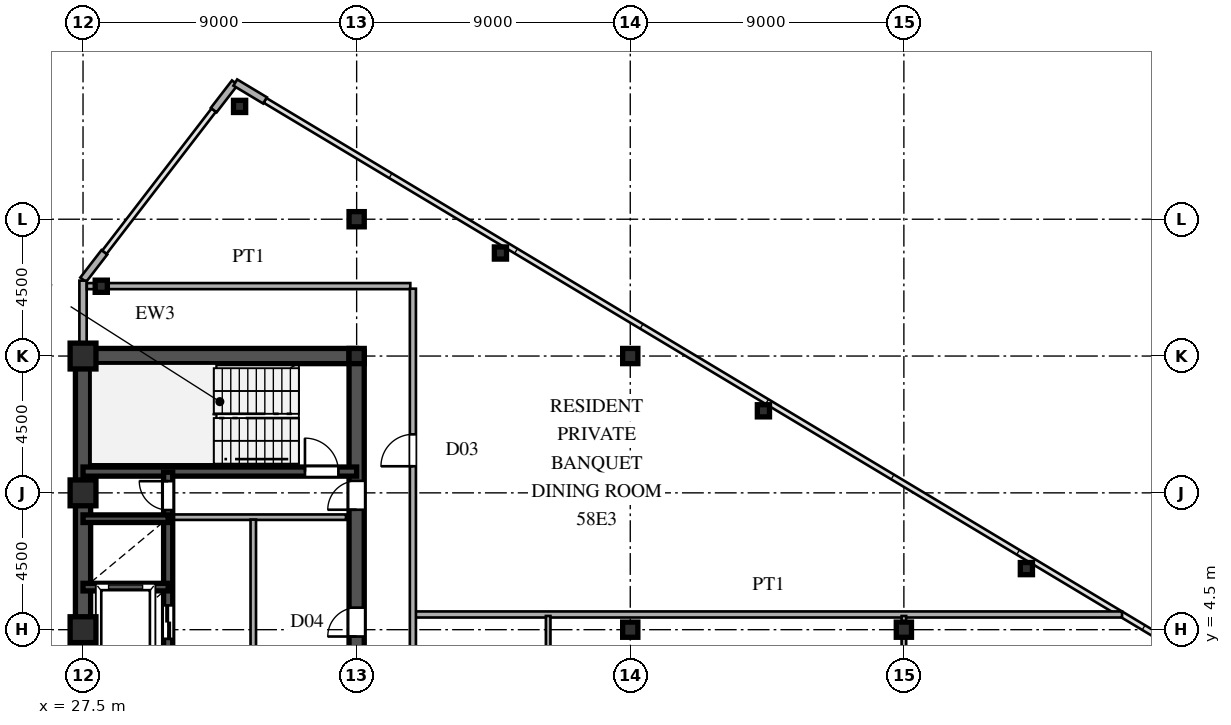
"""IFC4 building model, lengths in metres.
Left out: names, types, materials, properties, quantities, classifications, styles, units other than length and angle.
Written with IfcOpenShell. Run it as: python <this file> out.ifc"""

import sys

from ifc_helpers import new_model, si_unit, direction, frame, frame_2d, origin, origin_2d, place, context, subcontext, project, spatial, rectangle, hollow_rectangle, i_section, extrude, source, transform, mapped, element, fill, save


model = new_model("IFC4")
c1 = context("Model", 3, precision=1e-05, world=origin(), true_north=direction((0.0, 1.0)))
c2 = subcontext(c1, "Body", "Model", "MODEL_VIEW")
j1 = project(units=[si_unit("LENGTHUNIT", "METRE"), si_unit("PLANEANGLEUNIT", "RADIAN")], contexts=[c1])
p1 = place(None, origin())
s1 = spatial("IfcSite", under=j1, at=p1, CompositionType="ELEMENT")
p2 = place(p1, origin())
s2 = spatial("IfcBuilding", under=s1, at=p2, CompositionType="ELEMENT")
p3 = place(p2, frame((0.0, 0.0, 217.5)))
s3 = spatial("IfcBuildingStorey", under=s2, at=p3, CompositionType="ELEMENT", Elevation=217.5)
m1 = source(origin(), c2, "Body", "SweptSolid", [
    extrude(hollow_rectangle(XDim=0.85, YDim=0.85, WallThickness=0.036, at=origin_2d()), origin(), (0.0, 0.0, 1.0), 3.6),
])
for number, where, z_axis, x_axis in (
    (1, (27.5, 4.5, 0.0), (0.0, 0.0, 1.0), (1.0, 0.0, 0.0)),
    (2, (27.5, 9.0, 0.0), (0.0, 0.0, 1.0), (1.0, 0.0, 0.0)),
    (3, (27.5, 13.5, 0.0), (0.0, 0.0, 1.0), (1.0, 0.0, 0.0)),
):
    element("IfcColumn", number, at=place(p3, frame(where, z_axis=z_axis, x_axis=x_axis)), inside=s3, PredefinedType="COLUMN", context=c2, shape_type="MappedRepresentation", body=[
        mapped(m1, transform((0.0, 0.0, 0.0), scale=1.0)),
    ])
m2 = source(origin(), c2, "Body", "SweptSolid", [
    extrude(i_section(OverallWidth=0.5, OverallDepth=0.5, WebThickness=0.02, FlangeThickness=0.032, at=origin_2d()), origin(), (0.0, 0.0, 1.0), 3.6),
])
for number, where, z_axis, x_axis in (
    (4, (36.5, 13.5, 0.0), (0.0, 0.0, 1.0), (1.0, 0.0, 0.0)),
    (5, (36.5, 18.0, 0.0), (0.0, 0.0, 1.0), (1.0, 0.0, 0.0)),
    (6, (45.5, 4.5, 0.0), (0.0, 0.0, 1.0), (1.0, 0.0, 0.0)),
    (7, (45.5, 13.5, 0.0), (0.0, 0.0, 1.0), (1.0, 0.0, 0.0)),
    (8, (54.5, 4.5, 0.0), (0.0, 0.0, 1.0), (1.0, 0.0, 0.0)),
):
    element("IfcColumn", number, at=place(p3, frame(where, z_axis=z_axis, x_axis=x_axis)), inside=s3, PredefinedType="COLUMN", context=c2, shape_type="MappedRepresentation", body=[
        mapped(m2, transform((0.0, 0.0, 0.0), scale=1.0)),
    ])
m3 = source(origin(), c2, "Body", "SweptSolid", [
    extrude(hollow_rectangle(XDim=0.4, YDim=0.4, WallThickness=0.016, at=origin_2d()), origin(), (0.0, 0.0, 1.0), 3.6),
])
for number, where, z_axis, x_axis in (
    (9, (32.65, 21.71, 0.0), (0.0, 0.0, 1.0), (1.0, 0.0, 0.0)),
    (10, (28.1, 15.796, 0.0), (0.0, 0.0, 1.0), (1.0, 0.0, 0.0)),
    (11, (41.23, 16.889, 0.0), (0.0, 0.0, 1.0), (1.0, 0.0, 0.0)),
    (12, (49.88, 11.699, 0.0), (0.0, 0.0, 1.0), (1.0, 0.0, 0.0)),
    (13, (58.53, 6.509, 0.0), (0.0, 0.0, 1.0), (1.0, 0.0, 0.0)),
):
    element("IfcColumn", number, at=place(p3, frame(where, z_axis=z_axis, x_axis=x_axis)), inside=s3, PredefinedType="COLUMN", context=c2, shape_type="MappedRepresentation", body=[
        mapped(m3, transform((0.0, 0.0, 0.0), scale=1.0)),
    ])
for number, where, z_axis, x_axis in (
    (14, (33.486, 21.908, 0.0), (0.0, 0.0, 1.0), (-0.857, 0.515, 0.0)),
    (15, (32.494, 22.492, 0.0), (0.0, 0.0, 1.0), (-0.61, -0.793, 0.0)),
    (16, (28.201, 16.912, 0.0), (0.0, 0.0, 1.0), (-0.61, -0.793, 0.0)),
):
    element("IfcWall", number, at=place(p3, frame(where, z_axis=z_axis, x_axis=x_axis)), inside=s3, PredefinedType="SOLIDWALL", context=c2, shape_type="SweptSolid", body=[
        extrude(rectangle(XDim=1.14, YDim=0.24, at=frame_2d((0.57, 0.0))), origin(), (0.0, 0.0, 1.0), 3.38),
    ])
p4 = place(p3, frame((27.5, 13.755, 0.0), z_axis=(0.0, 0.0, 1.0), x_axis=(0.0, 1.0, 0.0)))
e17 = element("IfcWall", 17, at=p4, inside=s3, PredefinedType="SOLIDWALL", context=c2, shape_type="SweptSolid", body=[
    extrude(rectangle(XDim=0.62, YDim=0.24, at=frame_2d((0.31, 0.0))), origin(), (0.0, 0.0, 1.0), 2.88),
])
p5 = place(p3, frame((27.5, 14.375, 0.0), z_axis=(0.0, 0.0, 1.0), x_axis=(0.0, 1.0, 0.0)))
e18 = element("IfcWall", 18, at=p5, inside=s3, PredefinedType="SOLIDWALL", context=c2, shape_type="SweptSolid", body=[
    extrude(rectangle(XDim=1.605, YDim=0.24, at=frame_2d((0.803, 0.0))), origin(), (0.0, 0.0, 1.0), 3.38),
])
p6 = place(p3, frame((27.5, 1.3, 0.0), z_axis=(0.0, 0.0, 1.0), x_axis=(0.0, 1.0, 0.0)))
e19 = element("IfcWall", 19, at=p6, inside=s3, PredefinedType="SHEAR", context=c2, shape_type="SweptSolid", body=[
    extrude(rectangle(XDim=12.2, YDim=0.5, at=frame_2d((6.1, 0.0))), origin(), (0.0, 0.0, 1.0), 3.38),
])
p7 = place(p3, frame((27.5, 13.5, 0.0), z_axis=(0.0, 0.0, 1.0), x_axis=(1.0, 0.0, 0.0)))
e20 = element("IfcWall", 20, at=p7, inside=s3, PredefinedType="SHEAR", context=c2, shape_type="SweptSolid", body=[
    extrude(rectangle(XDim=9.0, YDim=0.5, at=frame_2d((4.5, 0.0))), origin(), (0.0, 0.0, 1.0), 3.38),
])
p8 = place(p3, frame((36.5, 8.2, 0.0), z_axis=(0.0, 0.0, 1.0), x_axis=(0.0, 1.0, 0.0)))
e21 = element("IfcWall", 21, at=p8, inside=s3, PredefinedType="SHEAR", context=c2, shape_type="SweptSolid", body=[
    extrude(rectangle(XDim=5.45, YDim=0.5, at=frame_2d((2.725, 0.0))), origin(), (0.0, 0.0, 1.0), 3.38),
])
p9 = place(p8, frame((0.245, 0.0, 0.0)))
e22 = element("IfcOpeningElement", 22, at=p9, cuts=e21, PredefinedType="OPENING", context=c2, shape_type="SweptSolid", body=[
    extrude(rectangle(XDim=0.95, YDim=2.15, at=frame_2d((0.475, 1.075))), frame((0.0, 0.26, 0.0), z_axis=(0.0, -1.0, 0.0), x_axis=(1.0, 0.0, 0.0)), (0.0, 0.0, 1.0), 0.52),
])
p10 = place(p3, frame((36.5, 1.3, 0.0), z_axis=(0.0, 0.0, 1.0), x_axis=(0.0, 1.0, 0.0)))
e23 = element("IfcWall", 23, at=p10, inside=s3, PredefinedType="SHEAR", context=c2, shape_type="SweptSolid", body=[
    extrude(rectangle(XDim=6.9, YDim=0.5, at=frame_2d((3.45, 0.0))), origin(), (0.0, 0.0, 1.0), 3.38),
])
p11 = place(p10, frame((2.975, 0.0, 0.0)))
e24 = element("IfcOpeningElement", 24, at=p11, cuts=e23, PredefinedType="OPENING", context=c2, shape_type="SweptSolid", body=[
    extrude(rectangle(XDim=0.95, YDim=2.15, at=frame_2d((0.475, 1.075))), frame((0.0, 0.26, 0.0), z_axis=(0.0, -1.0, 0.0), x_axis=(1.0, 0.0, 0.0)), (0.0, 0.0, 1.0), 0.52),
])
p12 = place(p3, frame((27.5, 9.7, 0.0), z_axis=(0.0, 0.0, 1.0), x_axis=(1.0, 0.0, 0.0)))
e25 = element("IfcWall", 25, at=p12, inside=s3, PredefinedType="SHEAR", context=c2, shape_type="SweptSolid", body=[
    extrude(rectangle(XDim=9.0, YDim=0.3, at=frame_2d((4.5, 0.0))), origin(), (0.0, 0.0, 1.0), 3.38),
])
p13 = place(p12, frame((7.3, 0.0, 0.0)))
e26 = element("IfcOpeningElement", 26, at=p13, cuts=e25, PredefinedType="OPENING", context=c2, shape_type="SweptSolid", body=[
    extrude(rectangle(XDim=1.1, YDim=2.2, at=frame_2d((0.55, 1.1))), frame((0.0, 0.16, 0.0), z_axis=(0.0, -1.0, 0.0), x_axis=(1.0, 0.0, 0.0)), (0.0, 0.0, 1.0), 0.32),
])
for number, where, z_axis, x_axis in (
    (27, (27.5, 5.9, 0.0), (0.0, 0.0, 1.0), (1.0, 0.0, 0.0)),
    (28, (27.5, 8.15, 0.0), (0.0, 0.0, 1.0), (1.0, 0.0, 0.0)),
):
    element("IfcWall", number, at=place(p3, frame(where, z_axis=z_axis, x_axis=x_axis)), inside=s3, PredefinedType="SHEAR", context=c2, shape_type="SweptSolid", body=[
        extrude(rectangle(XDim=2.8, YDim=0.25, at=frame_2d((1.4, 0.0))), origin(), (0.0, 0.0, 1.0), 3.38),
    ])
p14 = place(p3, frame((30.3, 3.6, 0.0), z_axis=(0.0, 0.0, 1.0), x_axis=(0.0, 1.0, 0.0)))
e29 = element("IfcWall", 29, at=p14, inside=s3, PredefinedType="SHEAR", context=c2, shape_type="SweptSolid", body=[
    extrude(rectangle(XDim=2.3, YDim=0.3, at=frame_2d((1.15, 0.0))), origin(), (0.0, 0.0, 1.0), 3.38),
])
p15 = place(p14, frame((0.6, 0.0, 0.0)))
e30 = element("IfcOpeningElement", 30, at=p15, cuts=e29, PredefinedType="OPENING", context=c2, shape_type="SweptSolid", body=[
    extrude(rectangle(XDim=1.1, YDim=2.2, at=frame_2d((0.55, 1.1))), frame((0.0, 0.16, 0.0), z_axis=(0.0, -1.0, 0.0), x_axis=(1.0, 0.0, 0.0)), (0.0, 0.0, 1.0), 0.32),
])
p16 = place(p3, frame((30.3, 5.9, 0.0), z_axis=(0.0, 0.0, 1.0), x_axis=(0.0, 1.0, 0.0)))
e31 = element("IfcWall", 31, at=p16, inside=s3, PredefinedType="SHEAR", context=c2, shape_type="SweptSolid", body=[
    extrude(rectangle(XDim=2.25, YDim=0.3, at=frame_2d((1.125, 0.0))), origin(), (0.0, 0.0, 1.0), 3.38),
])
p17 = place(p3, frame((30.3, 8.15, 0.0), z_axis=(0.0, 0.0, 1.0), x_axis=(0.0, 1.0, 0.0)))
e32 = element("IfcWall", 32, at=p17, inside=s3, PredefinedType="SHEAR", context=c2, shape_type="SweptSolid", body=[
    extrude(rectangle(XDim=1.53, YDim=0.3, at=frame_2d((0.765, 0.0))), origin(), (0.0, 0.0, 1.0), 3.38),
])
p18 = place(p17, frame((0.285, 0.0, 0.0)))
e33 = element("IfcOpeningElement", 33, at=p18, cuts=e32, PredefinedType="OPENING", context=c2, shape_type="SweptSolid", body=[
    extrude(rectangle(XDim=0.95, YDim=2.15, at=frame_2d((0.475, 1.075))), frame((0.0, 0.16, 0.0), z_axis=(0.0, -1.0, 0.0), x_axis=(1.0, 0.0, 0.0)), (0.0, 0.0, 1.0), 0.32),
])
p19 = place(p3, frame((30.45, 8.2, 0.0), z_axis=(0.0, 0.0, 1.0), x_axis=(1.0, 0.0, 0.0)))
e34 = element("IfcWall", 34, at=p19, inside=s3, PredefinedType="PARTITIONING", context=c2, shape_type="SweptSolid", body=[
    extrude(rectangle(XDim=5.7, YDim=0.18, at=frame_2d((2.85, 0.0))), origin(), (0.0, 0.0, 1.0), 3.38),
])
p20 = place(p3, frame((33.1, 1.38, 0.0), z_axis=(0.0, 0.0, 1.0), x_axis=(0.0, 1.0, 0.0)))
e35 = element("IfcWall", 35, at=p20, inside=s3, PredefinedType="PARTITIONING", context=c2, shape_type="SweptSolid", body=[
    extrude(rectangle(XDim=6.74, YDim=0.18, at=frame_2d((3.37, 0.0))), origin(), (0.0, 0.0, 1.0), 3.38),
])
p21 = place(p3, frame((38.43, 5.0, 0.0), z_axis=(0.0, 0.0, 1.0), x_axis=(1.0, 0.0, 0.0)))
e36 = element("IfcWall", 36, at=p21, inside=s3, PredefinedType="PARTITIONING", context=c2, shape_type="SweptSolid", body=[
    extrude(rectangle(XDim=23.246, YDim=0.2, at=frame_2d((11.623, 0.0))), origin(), (0.0, 0.0, 1.0), 3.38),
])
p22 = place(p3, frame((27.625, 15.8, 0.0), z_axis=(0.0, 0.0, 1.0), x_axis=(1.0, 0.0, 0.0)))
e37 = element("IfcWall", 37, at=p22, inside=s3, PredefinedType="PARTITIONING", context=c2, shape_type="SweptSolid", body=[
    extrude(rectangle(XDim=10.64, YDim=0.2, at=frame_2d((5.32, 0.0))), origin(), (0.0, 0.0, 1.0), 3.38),
])
p23 = place(p3, frame((38.35, -15.715, 0.0), z_axis=(0.0, 0.0, 1.0), x_axis=(0.0, 1.0, 0.0)))
e38 = element("IfcWall", 38, at=p23, inside=s3, PredefinedType="PARTITIONING", context=c2, shape_type="SweptSolid", body=[
    extrude(rectangle(XDim=31.43, YDim=0.2, at=frame_2d((15.715, 0.0))), origin(), (0.0, 0.0, 1.0), 3.38),
])
p24 = place(p23, frame((3.09, 0.0, 0.0)))
e39 = element("IfcOpeningElement", 39, at=p24, cuts=e38, PredefinedType="OPENING", context=c2, shape_type="SweptSolid", body=[
    extrude(rectangle(XDim=1.05, YDim=2.25, at=frame_2d((0.525, 1.125))), frame((0.0, 0.11, 0.0), z_axis=(0.0, -1.0, 0.0), x_axis=(1.0, 0.0, 0.0)), (0.0, 0.0, 1.0), 0.22),
])
p25 = place(p23, frame((13.289, 0.0, 0.0)))
e40 = element("IfcOpeningElement", 40, at=p25, cuts=e38, PredefinedType="OPENING", context=c2, shape_type="SweptSolid", body=[
    extrude(rectangle(XDim=1.05, YDim=2.25, at=frame_2d((0.525, 1.125))), frame((0.0, 0.11, 0.0), z_axis=(0.0, -1.0, 0.0), x_axis=(1.0, 0.0, 0.0)), (0.0, 0.0, 1.0), 0.22),
])
p26 = place(p23, frame((25.59, 0.0, 0.0)))
e41 = element("IfcOpeningElement", 41, at=p26, cuts=e38, PredefinedType="OPENING", context=c2, shape_type="SweptSolid", body=[
    extrude(rectangle(XDim=1.05, YDim=2.25, at=frame_2d((0.525, 1.125))), frame((0.0, 0.11, 0.0), z_axis=(0.0, -1.0, 0.0), x_axis=(1.0, 0.0, 0.0)), (0.0, 0.0, 1.0), 0.22),
])
p27 = place(p3, frame((42.8, 1.032, 0.0), z_axis=(0.0, 0.0, 1.0), x_axis=(0.0, 1.0, 0.0)))
e42 = element("IfcWall", 42, at=p27, inside=s3, PredefinedType="PARTITIONING", context=c2, shape_type="SweptSolid", body=[
    extrude(rectangle(XDim=3.918, YDim=0.15, at=frame_2d((1.959, 0.0))), origin(), (0.0, 0.0, 1.0), 3.38),
])
p28 = place(p3, frame((54.5, -8.35, 0.0), z_axis=(0.0, 0.0, 1.0), x_axis=(0.0, 1.0, 0.0)))
e43 = element("IfcWall", 43, at=p28, inside=s3, PredefinedType="PARTITIONING", context=c2, shape_type="SweptSolid", body=[
    extrude(rectangle(XDim=13.3, YDim=0.15, at=frame_2d((6.65, 0.0))), origin(), (0.0, 0.0, 1.0), 2.78),
])
p29 = place(p28, frame((6.175, 0.0, 0.0)))
e44 = element("IfcOpeningElement", 44, at=p29, cuts=e43, PredefinedType="OPENING", context=c2, shape_type="SweptSolid", body=[
    extrude(rectangle(XDim=0.95, YDim=2.15, at=frame_2d((0.475, 1.075))), frame((0.0, 0.085, 0.0), z_axis=(0.0, -1.0, 0.0), x_axis=(1.0, 0.0, 0.0)), (0.0, 0.0, 1.0), 0.17),
])
m4 = source(origin(), c2, "Body", "SweptSolid", [
    extrude(rectangle(XDim=0.95, YDim=2.15, at=frame_2d((0.475, 1.075))), frame((0.0, 0.025, 0.0), z_axis=(0.0, -1.0, 0.0), x_axis=(1.0, 0.0, 0.0)), (0.0, 0.0, 1.0), 0.05),
])
p30 = place(p9, origin())
e45 = element("IfcDoor", 45, at=p30, inside=s3, OperationType="SINGLE_SWING_LEFT", PredefinedType="DOOR", context=c2, shape_type="MappedRepresentation", body=[
    mapped(m4, transform((0.0, 0.0, 0.0), scale=1.0)),
])
fill(e22, e45)
p31 = place(p11, origin())
e46 = element("IfcDoor", 46, at=p31, inside=s3, OperationType="SINGLE_SWING_LEFT", PredefinedType="DOOR", context=c2, shape_type="MappedRepresentation", body=[
    mapped(m4, transform((0.0, 0.0, 0.0), scale=1.0)),
])
fill(e24, e46)
m5 = source(origin(), c2, "Body", "SweptSolid", [
    extrude(rectangle(XDim=1.1, YDim=2.2, at=frame_2d((0.55, 1.1))), frame((0.0, 0.025, 0.0), z_axis=(0.0, -1.0, 0.0), x_axis=(1.0, 0.0, 0.0)), (0.0, 0.0, 1.0), 0.05),
])
p32 = place(p13, origin())
e47 = element("IfcDoor", 47, at=p32, inside=s3, OperationType="SINGLE_SWING_LEFT", PredefinedType="DOOR", context=c2, shape_type="MappedRepresentation", body=[
    mapped(m5, transform((0.0, 0.0, 0.0), scale=1.0)),
])
fill(e26, e47)
m6 = source(origin(), c2, "Body", "SweptSolid", [
    extrude(rectangle(XDim=1.1, YDim=2.2, at=frame_2d((0.55, 1.1))), frame((0.0, 0.025, 0.0), z_axis=(0.0, -1.0, 0.0), x_axis=(1.0, 0.0, 0.0)), (0.0, 0.0, 1.0), 0.05),
])
p33 = place(p15, origin())
e48 = element("IfcDoor", 48, at=p33, inside=s3, OperationType="DOUBLE_DOOR_SLIDING", PredefinedType="DOOR", context=c2, shape_type="MappedRepresentation", body=[
    mapped(m6, transform((0.0, 0.0, 0.0), scale=1.0)),
])
fill(e30, e48)
p34 = place(p18, origin())
e49 = element("IfcDoor", 49, at=p34, inside=s3, OperationType="SINGLE_SWING_RIGHT", PredefinedType="DOOR", context=c2, shape_type="MappedRepresentation", body=[
    mapped(m4, transform((0.0, 0.0, 0.0), scale=1.0)),
])
fill(e33, e49)
m7 = source(origin(), c2, "Body", "SweptSolid", [
    extrude(rectangle(XDim=1.05, YDim=2.25, at=frame_2d((0.525, 1.125))), frame((0.0, 0.025, 0.0), z_axis=(0.0, -1.0, 0.0), x_axis=(1.0, 0.0, 0.0)), (0.0, 0.0, 1.0), 0.05),
])
p35 = place(p26, origin())
e50 = element("IfcDoor", 50, at=p35, inside=s3, OperationType="SINGLE_SWING_LEFT", PredefinedType="DOOR", context=c2, shape_type="MappedRepresentation", body=[
    mapped(m7, transform((0.0, 0.0, 0.0), scale=1.0)),
])
fill(e41, e50)
save(model, sys.argv[1])
